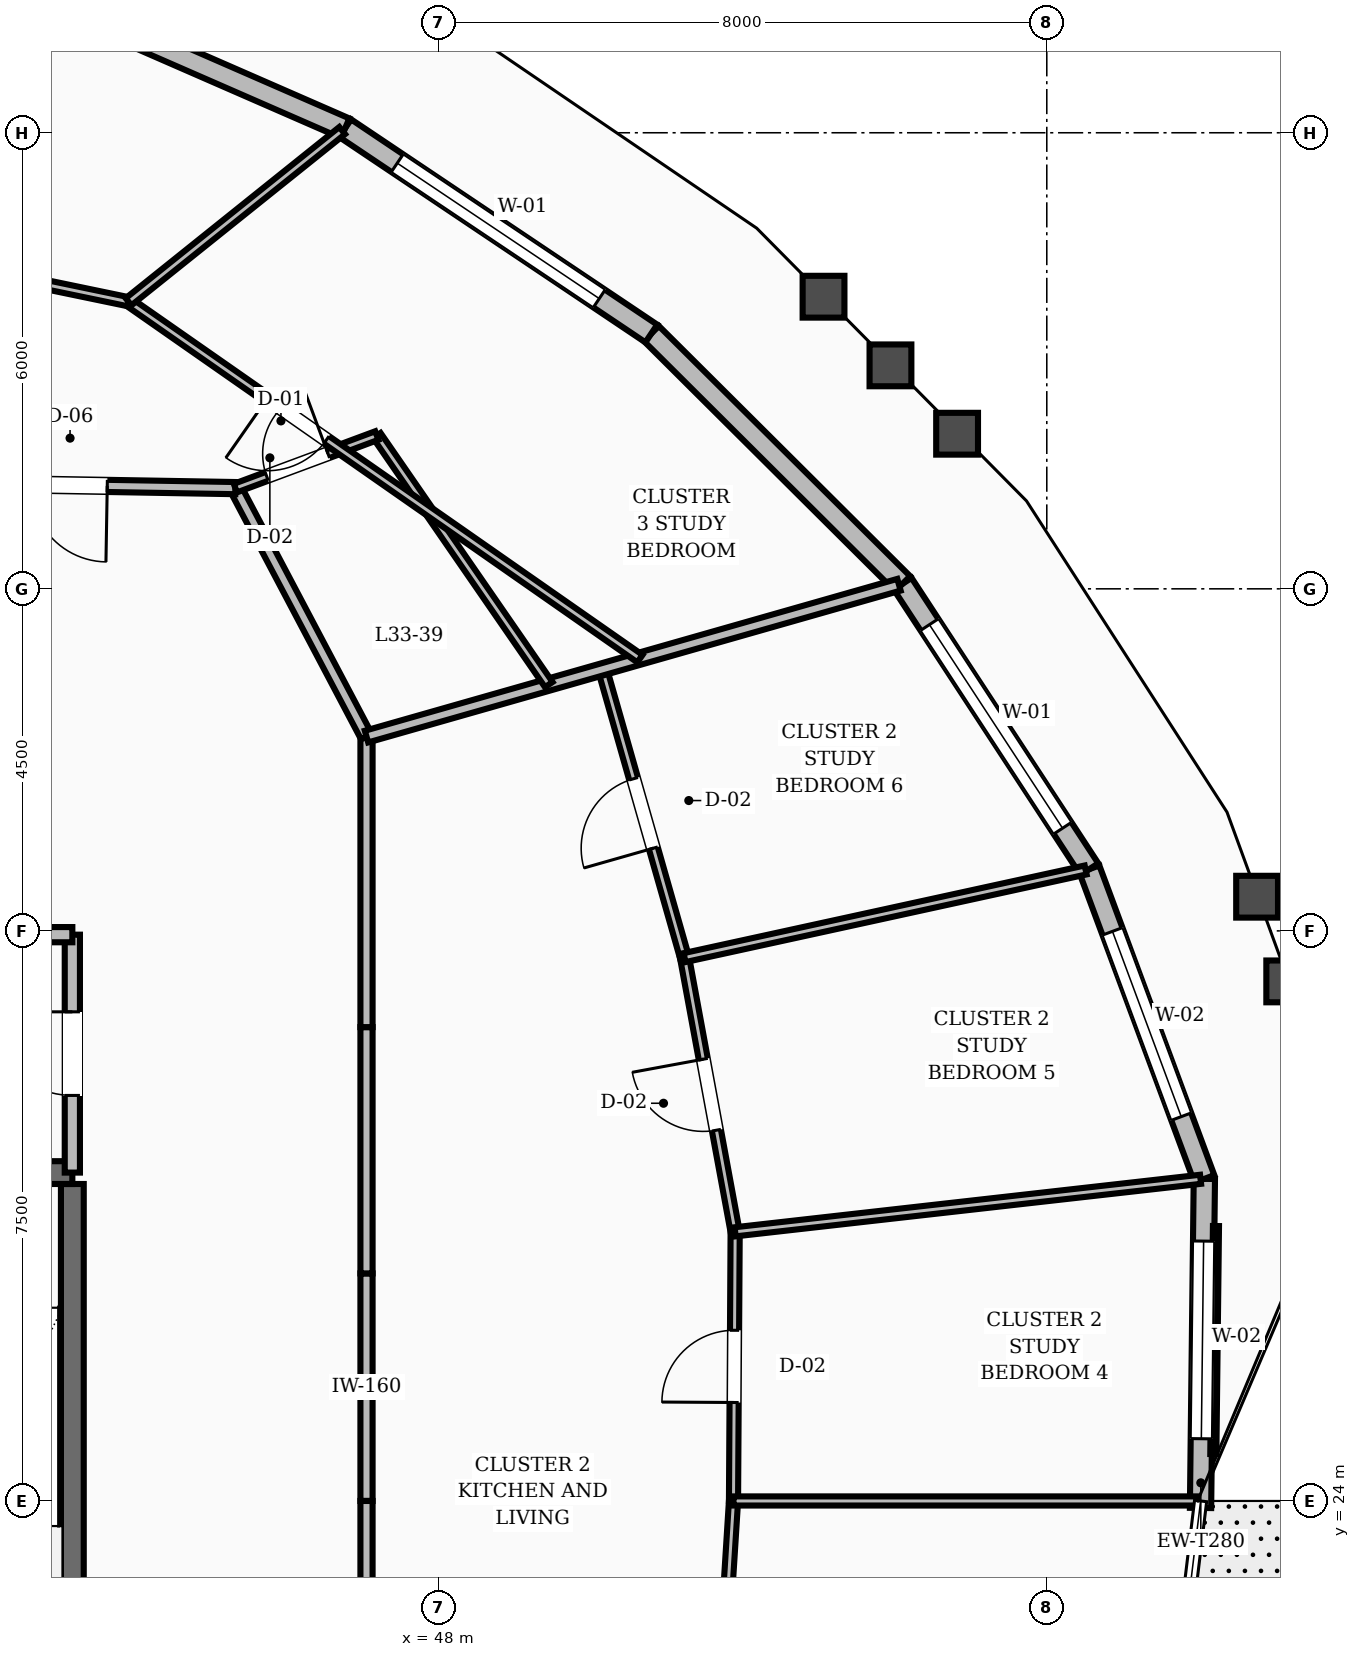
"""IFC4 building model, lengths in metres.
Left out: names, types, materials, properties, quantities, classifications, styles, units other than length and angle.
Written with IfcOpenShell. Run it as: python <this file> out.ifc"""

import sys

from ifc_helpers import new_model, si_unit, direction, frame, frame_2d, origin, place, context, subcontext, project, spatial, rectangle, extrude, element, fill, save


model = new_model("IFC4")
c1 = context("Model", 3, precision=1e-05, world=origin(), true_north=direction((0.0, 1.0)))
c2 = subcontext(c1, "Body", "Model", "MODEL_VIEW")
j1 = project(units=[si_unit("LENGTHUNIT", "METRE"), si_unit("PLANEANGLEUNIT", "RADIAN")], contexts=[c1])
p1 = place(None, origin())
s1 = spatial("IfcSite", under=j1, at=p1, CompositionType="ELEMENT")
p2 = place(p1, origin())
s2 = spatial("IfcBuilding", under=s1, at=p2, CompositionType="ELEMENT")
p3 = place(p2, frame((0.0, 0.0, 131.6)))
s3 = spatial("IfcBuildingStorey", under=s2, at=p3, CompositionType="ELEMENT", Elevation=131.6)
p4 = place(p3, frame((43.18, 19.43, 0.0), z_axis=(0.0, 0.0, 1.0), x_axis=(0.0, 1.0, 0.0)))
e1 = element("IfcWall", 1, at=p4, inside=s3, PredefinedType="SHEAR", context=c2, shape_type="SweptSolid", body=[
    extrude(rectangle(XDim=8.74, YDim=0.3, at=frame_2d((4.37, 0.0))), origin(), (0.0, 0.0, 1.0), 3.6),
])
p5 = place(p3, frame((39.58, 28.32, 0.0), z_axis=(0.0, 0.0, 1.0), x_axis=(1.0, 0.0, 0.0)))
e2 = element("IfcWall", 2, at=p5, inside=s3, PredefinedType="SHEAR", context=c2, shape_type="SweptSolid", body=[
    extrude(rectangle(XDim=3.6, YDim=0.3, at=frame_2d((1.8, 0.0))), origin(), (0.0, 0.0, 1.0), 3.6),
])
p6 = place(p5, frame((1.3, 0.0, 0.0)))
e3 = element("IfcOpeningElement", 3, at=p6, cuts=e2, PredefinedType="OPENING", context=c2, shape_type="SweptSolid", body=[
    extrude(rectangle(XDim=1.1, YDim=2.1, at=frame_2d((0.55, 1.05))), frame((0.0, 0.16, 0.0), z_axis=(0.0, -1.0, 0.0), x_axis=(1.0, 0.0, 0.0)), (0.0, 0.0, 1.0), 0.32),
])
p7 = place(p3, frame((58.023, 23.908, 0.0), z_axis=(0.0, 0.0, 1.0), x_axis=(0.011615321034, 0.999932539883, 0.0)))
e4 = element("IfcWall", 4, at=p7, inside=s3, PredefinedType="STANDARD", context=c2, shape_type="SweptSolid", body=[
    extrude(rectangle(XDim=4.33, YDim=0.28, at=frame_2d((2.165, 0.0))), origin(), (0.0, 0.0, 1.0), 2.82),
])
p8 = place(p7, frame((0.911, 0.0, 0.8)))
e5 = element("IfcOpeningElement", 5, at=p8, cuts=e4, PredefinedType="OPENING", context=c2, shape_type="SweptSolid", body=[
    extrude(rectangle(XDim=2.6, YDim=1.65, at=frame_2d((1.3, 0.825))), frame((0.0, 0.15, 0.0), z_axis=(0.0, -1.0, 0.0), x_axis=(1.0, 0.0, 0.0)), (0.0, 0.0, 1.0), 0.3),
])
p9 = place(p3, frame((58.073, 28.238, 0.0), z_axis=(0.0, 0.0, 1.0), x_axis=(-0.348099086438, 0.937457746259, 0.0)))
e6 = element("IfcWall", 6, at=p9, inside=s3, PredefinedType="STANDARD", context=c2, shape_type="SweptSolid", body=[
    extrude(rectangle(XDim=4.346, YDim=0.28, at=frame_2d((2.173, 0.0))), origin(), (0.0, 0.0, 1.0), 2.82),
])
p10 = place(p9, frame((0.873, 0.0, 0.8)))
e7 = element("IfcOpeningElement", 7, at=p10, cuts=e6, PredefinedType="OPENING", context=c2, shape_type="SweptSolid", body=[
    extrude(rectangle(XDim=2.6, YDim=1.65, at=frame_2d((1.3, 0.825))), frame((0.0, 0.15, 0.0), z_axis=(0.0, -1.0, 0.0), x_axis=(1.0, 0.0, 0.0)), (0.0, 0.0, 1.0), 0.3),
])
p11 = place(p3, frame((56.56, 32.312, 0.0), z_axis=(0.0, 0.0, 1.0), x_axis=(-0.547422319482, 0.836856501518, 0.0)))
e8 = element("IfcWall", 8, at=p11, inside=s3, PredefinedType="STANDARD", context=c2, shape_type="SweptSolid", body=[
    extrude(rectangle(XDim=4.488, YDim=0.28, at=frame_2d((2.244, 0.0))), origin(), (0.0, 0.0, 1.0), 2.82),
])
p12 = place(p11, frame((0.644, 0.0, 0.8)))
e9 = element("IfcOpeningElement", 9, at=p12, cuts=e8, PredefinedType="OPENING", context=c2, shape_type="SweptSolid", body=[
    extrude(rectangle(XDim=3.2, YDim=1.65, at=frame_2d((1.6, 0.825))), frame((0.0, 0.15, 0.0), z_axis=(0.0, -1.0, 0.0), x_axis=(1.0, 0.0, 0.0)), (0.0, 0.0, 1.0), 0.3),
])
p13 = place(p3, frame((54.104, 36.067, 0.0), z_axis=(0.0, 0.0, 1.0), x_axis=(-0.708648936292, 0.705561255379, 0.0)))
e10 = element("IfcWall", 10, at=p13, inside=s3, PredefinedType="STANDARD", context=c2, shape_type="SweptSolid", body=[
    extrude(rectangle(XDim=4.665, YDim=0.28, at=frame_2d((2.333, 0.0))), origin(), (0.0, 0.0, 1.0), 2.82),
])
p14 = place(p3, frame((50.798, 39.359, 0.0), z_axis=(0.0, 0.0, 1.0), x_axis=(-0.830576039751, 0.556905236277, 0.0)))
e11 = element("IfcWall", 11, at=p14, inside=s3, PredefinedType="STANDARD", context=c2, shape_type="SweptSolid", body=[
    extrude(rectangle(XDim=4.85, YDim=0.28, at=frame_2d((2.425, 0.0))), origin(), (0.0, 0.0, 1.0), 2.82),
])
p15 = place(p14, frame((0.825, 0.0, 0.8)))
e12 = element("IfcOpeningElement", 12, at=p15, cuts=e11, PredefinedType="OPENING", context=c2, shape_type="SweptSolid", body=[
    extrude(rectangle(XDim=3.2, YDim=1.65, at=frame_2d((1.6, 0.825))), frame((0.0, 0.15, 0.0), z_axis=(0.0, -1.0, 0.0), x_axis=(1.0, 0.0, 0.0)), (0.0, 0.0, 1.0), 0.3),
])
p16 = place(p3, frame((46.769, 42.06, 0.0), z_axis=(0.0, 0.0, 1.0), x_axis=(-0.916424160111, 0.400208394171, 0.0)))
e13 = element("IfcWall", 13, at=p16, inside=s3, PredefinedType="STANDARD", context=c2, shape_type="SweptSolid", body=[
    extrude(rectangle(XDim=5.015, YDim=0.28, at=frame_2d((2.508, 0.0))), origin(), (0.0, 0.0, 1.0), 2.82),
])
p17 = place(p3, frame((43.18, 28.32, 0.0), z_axis=(0.0, 0.0, 1.0), x_axis=(0.0, 1.0, 0.0)))
e14 = element("IfcWall", 14, at=p17, inside=s3, PredefinedType="SOLIDWALL", context=c2, shape_type="SweptSolid", body=[
    extrude(rectangle(XDim=3.13, YDim=0.2, at=frame_2d((1.565, 0.0))), origin(), (0.0, 0.0, 1.0), 2.8),
])
p18 = place(p17, frame((1.015, 0.0, 0.0)))
e15 = element("IfcOpeningElement", 15, at=p18, cuts=e14, PredefinedType="OPENING", context=c2, shape_type="SweptSolid", body=[
    extrude(rectangle(XDim=1.1, YDim=2.1, at=frame_2d((0.55, 1.05))), frame((0.0, 0.11, 0.0), z_axis=(0.0, -1.0, 0.0), x_axis=(1.0, 0.0, 0.0)), (0.0, 0.0, 1.0), 0.22),
])
p19 = place(p3, frame((39.2, 31.45, 0.0), z_axis=(0.0, 0.0, 1.0), x_axis=(1.0, 0.0, 0.0)))
e16 = element("IfcWall", 16, at=p19, inside=s3, PredefinedType="SOLIDWALL", context=c2, shape_type="SweptSolid", body=[
    extrude(rectangle(XDim=3.98, YDim=0.2, at=frame_2d((1.99, 0.0))), origin(), (0.0, 0.0, 1.0), 2.8),
])
p20 = place(p3, frame((47.05, 24.0, 0.0), z_axis=(0.0, 0.0, 1.0), x_axis=(0.0, 1.0, 0.0)))
e17 = element("IfcWall", 17, at=p20, inside=s3, PredefinedType="SOLIDWALL", context=c2, shape_type="SweptSolid", body=[
    extrude(rectangle(XDim=2.994, YDim=0.16, at=frame_2d((1.497, 0.0))), origin(), (0.0, 0.0, 1.0), 2.8),
])
p21 = place(p3, frame((47.05, 26.994, 0.0), z_axis=(0.0, 0.0, 1.0), x_axis=(0.0, 1.0, 0.0)))
e18 = element("IfcWall", 18, at=p21, inside=s3, PredefinedType="SOLIDWALL", context=c2, shape_type="SweptSolid", body=[
    extrude(rectangle(XDim=3.24, YDim=0.16, at=frame_2d((1.62, 0.0))), origin(), (0.0, 0.0, 1.0), 2.8),
])
p22 = place(p3, frame((47.05, 30.234, 0.0), z_axis=(0.0, 0.0, 1.0), x_axis=(0.0, 1.0, 0.0)))
e19 = element("IfcWall", 19, at=p22, inside=s3, PredefinedType="SOLIDWALL", context=c2, shape_type="SweptSolid", body=[
    extrude(rectangle(XDim=3.822, YDim=0.16, at=frame_2d((1.911, 0.0))), origin(), (0.0, 0.0, 1.0), 2.8),
])
p23 = place(p3, frame((47.05, 34.056, 0.0), z_axis=(0.0, 0.0, 1.0), x_axis=(-0.466737093093, 0.884396113702, 0.0)))
e20 = element("IfcWall", 20, at=p23, inside=s3, PredefinedType="SOLIDWALL", context=c2, shape_type="SweptSolid", body=[
    extrude(rectangle(XDim=3.696, YDim=0.16, at=frame_2d((1.848, 0.0))), origin(), (0.0, 0.0, 1.0), 2.8),
])
p24 = place(p3, frame((45.325, 37.325, 0.0), z_axis=(0.0, 0.0, 1.0), x_axis=(-0.999853038912, 0.017143528788, 0.0)))
e21 = element("IfcWall", 21, at=p24, inside=s3, PredefinedType="SOLIDWALL", context=c2, shape_type="SweptSolid", body=[
    extrude(rectangle(XDim=4.372, YDim=0.16, at=frame_2d((2.186, 0.0))), origin(), (0.0, 0.0, 1.0), 2.8),
])
p25 = place(p24, frame((1.686, 0.0, 0.0)))
e22 = element("IfcOpeningElement", 22, at=p25, cuts=e21, PredefinedType="OPENING", context=c2, shape_type="SweptSolid", body=[
    extrude(rectangle(XDim=1.0, YDim=2.1, at=frame_2d((0.5, 1.05))), frame((0.0, 0.09, 0.0), z_axis=(0.0, -1.0, 0.0), x_axis=(1.0, 0.0, 0.0)), (0.0, 0.0, 1.0), 0.18),
])
p26 = place(p3, frame((47.05, 21.006, 0.0), z_axis=(0.0, 0.0, 1.0), x_axis=(0.0, 1.0, 0.0)))
e23 = element("IfcWall", 23, at=p26, inside=s3, PredefinedType="SOLIDWALL", context=c2, shape_type="SweptSolid", body=[
    extrude(rectangle(XDim=2.994, YDim=0.16, at=frame_2d((1.497, 0.0))), origin(), (0.0, 0.0, 1.0), 2.8),
])
p27 = place(p3, frame((51.658, 20.507, 0.0), z_axis=(0.0, 0.0, 1.0), x_axis=(0.062851654095, 0.998022880288, 0.0)))
e24 = element("IfcWall", 24, at=p27, inside=s3, PredefinedType="PARTITIONING", context=c2, shape_type="SweptSolid", body=[
    extrude(rectangle(XDim=3.5, YDim=0.12, at=frame_2d((1.75, 0.0))), origin(), (0.0, 0.0, 1.0), 2.8),
])
p28 = place(p27, frame((1.275, 0.0, 0.0)))
e25 = element("IfcOpeningElement", 25, at=p28, cuts=e24, PredefinedType="OPENING", context=c2, shape_type="SweptSolid", body=[
    extrude(rectangle(XDim=0.95, YDim=2.1, at=frame_2d((0.475, 1.05))), frame((0.0, 0.07, 0.0), z_axis=(0.0, -1.0, 0.0), x_axis=(1.0, 0.0, 0.0)), (0.0, 0.0, 1.0), 0.14),
])
p29 = place(p3, frame((51.878, 24.0, 0.0), z_axis=(0.0, 0.0, 1.0), x_axis=(0.006136122757, 0.999981173822, 0.0)))
e26 = element("IfcWall", 26, at=p29, inside=s3, PredefinedType="PARTITIONING", context=c2, shape_type="SweptSolid", body=[
    extrude(rectangle(XDim=3.541, YDim=0.12, at=frame_2d((1.771, 0.0))), origin(), (0.0, 0.0, 1.0), 2.8),
])
p30 = place(p29, frame((1.295, 0.0, 0.0)))
e27 = element("IfcOpeningElement", 27, at=p30, cuts=e26, PredefinedType="OPENING", context=c2, shape_type="SweptSolid", body=[
    extrude(rectangle(XDim=0.95, YDim=2.1, at=frame_2d((0.475, 1.05))), frame((0.0, 0.07, 0.0), z_axis=(0.0, -1.0, 0.0), x_axis=(1.0, 0.0, 0.0)), (0.0, 0.0, 1.0), 0.14),
])
p31 = place(p3, frame((51.878, 24.0, 0.0), z_axis=(0.0, 0.0, 1.0), x_axis=(1.0, 0.0, 0.0)))
e28 = element("IfcWall", 28, at=p31, inside=s3, PredefinedType="PARTITIONING", context=c2, shape_type="SweptSolid", body=[
    extrude(rectangle(XDim=6.095, YDim=0.12, at=frame_2d((3.048, 0.0))), origin(), (0.0, 0.0, 1.0), 2.8),
])
p32 = place(p3, frame((51.9, 27.541, 0.0), z_axis=(0.0, 0.0, 1.0), x_axis=(-0.181502919565, 0.983390405785, 0.0)))
e29 = element("IfcWall", 29, at=p32, inside=s3, PredefinedType="PARTITIONING", context=c2, shape_type="SweptSolid", body=[
    extrude(rectangle(XDim=3.668, YDim=0.12, at=frame_2d((1.834, 0.0))), origin(), (0.0, 0.0, 1.0), 2.8),
])
p33 = place(p32, frame((1.359, 0.0, 0.0)))
e30 = element("IfcOpeningElement", 30, at=p33, cuts=e29, PredefinedType="OPENING", context=c2, shape_type="SweptSolid", body=[
    extrude(rectangle(XDim=0.95, YDim=2.1, at=frame_2d((0.475, 1.05))), frame((0.0, 0.07, 0.0), z_axis=(0.0, -1.0, 0.0), x_axis=(1.0, 0.0, 0.0)), (0.0, 0.0, 1.0), 0.14),
])
p34 = place(p3, frame((51.9, 27.541, 0.0), z_axis=(0.0, 0.0, 1.0), x_axis=(0.993693846481, 0.112127335947, 0.0)))
e31 = element("IfcWall", 31, at=p34, inside=s3, PredefinedType="PARTITIONING", context=c2, shape_type="SweptSolid", body=[
    extrude(rectangle(XDim=6.162, YDim=0.12, at=frame_2d((3.081, 0.0))), origin(), (0.0, 0.0, 1.0), 2.8),
])
p35 = place(p3, frame((51.234, 31.148, 0.0), z_axis=(0.0, 0.0, 1.0), x_axis=(-0.274058783109, 0.961712942307, 0.0)))
e32 = element("IfcWall", 32, at=p35, inside=s3, PredefinedType="PARTITIONING", context=c2, shape_type="SweptSolid", body=[
    extrude(rectangle(XDim=3.944, YDim=0.12, at=frame_2d((1.972, 0.0))), origin(), (0.0, 0.0, 1.0), 2.8),
])
p36 = place(p35, frame((1.497, 0.0, 0.0)))
e33 = element("IfcOpeningElement", 33, at=p36, cuts=e32, PredefinedType="OPENING", context=c2, shape_type="SweptSolid", body=[
    extrude(rectangle(XDim=0.95, YDim=2.1, at=frame_2d((0.475, 1.05))), frame((0.0, 0.07, 0.0), z_axis=(0.0, -1.0, 0.0), x_axis=(1.0, 0.0, 0.0)), (0.0, 0.0, 1.0), 0.14),
])
p37 = place(p3, frame((51.234, 31.148, 0.0), z_axis=(0.0, 0.0, 1.0), x_axis=(0.976938334756, 0.213521638447, 0.0)))
e34 = element("IfcWall", 34, at=p37, inside=s3, PredefinedType="PARTITIONING", context=c2, shape_type="SweptSolid", body=[
    extrude(rectangle(XDim=5.401, YDim=0.12, at=frame_2d((2.701, 0.0))), origin(), (0.0, 0.0, 1.0), 2.8),
])
p38 = place(p3, frame((47.05, 34.056, 0.0), z_axis=(0.0, 0.0, 1.0), x_axis=(0.961667991251, 0.274216473981, 0.0)))
e35 = element("IfcWall", 35, at=p38, inside=s3, PredefinedType="SOLIDWALL", context=c2, shape_type="SweptSolid", body=[
    extrude(rectangle(XDim=7.285, YDim=0.16, at=frame_2d((3.642, 0.0))), origin(), (0.0, 0.0, 1.0), 2.8),
])
p39 = place(p3, frame((49.448, 34.74, 0.0), z_axis=(0.0, 0.0, 1.0), x_axis=(-0.568195659841, 0.822893487723, 0.0)))
e36 = element("IfcWall", 36, at=p39, inside=s3, PredefinedType="PARTITIONING", context=c2, shape_type="SweptSolid", body=[
    extrude(rectangle(XDim=3.982, YDim=0.12, at=frame_2d((1.991, 0.0))), origin(), (0.0, 0.0, 1.0), 2.8),
])
p40 = place(p3, frame((45.325, 37.325, 0.0), z_axis=(0.0, 0.0, 1.0), x_axis=(0.937346114238, 0.348399572506, 0.0)))
e37 = element("IfcWall", 37, at=p40, inside=s3, PredefinedType="PARTITIONING", context=c2, shape_type="SweptSolid", body=[
    extrude(rectangle(XDim=1.985, YDim=0.12, at=frame_2d((0.993, 0.0))), origin(), (0.0, 0.0, 1.0), 2.8),
])
p41 = place(p40, frame((0.44, 0.0, 0.0)))
e38 = element("IfcOpeningElement", 38, at=p41, cuts=e37, PredefinedType="OPENING", context=c2, shape_type="SweptSolid", body=[
    extrude(rectangle(XDim=0.86, YDim=2.1, at=frame_2d((0.43, 1.05))), frame((0.0, 0.07, 0.0), z_axis=(0.0, -1.0, 0.0), x_axis=(1.0, 0.0, 0.0)), (0.0, 0.0, 1.0), 0.14),
])
p42 = place(p3, frame((50.647, 35.082, 0.0), z_axis=(0.0, 0.0, 1.0), x_axis=(-0.820068492929, 0.572265381537, 0.0)))
e39 = element("IfcWall", 39, at=p42, inside=s3, PredefinedType="PARTITIONING", context=c2, shape_type="SweptSolid", body=[
    extrude(rectangle(XDim=8.204, YDim=0.12, at=frame_2d((4.102, 0.0))), origin(), (0.0, 0.0, 1.0), 2.8),
])
p43 = place(p42, frame((5.029, 0.0, 0.0)))
e40 = element("IfcOpeningElement", 40, at=p43, cuts=e39, PredefinedType="OPENING", context=c2, shape_type="SweptSolid", body=[
    extrude(rectangle(XDim=0.95, YDim=2.1, at=frame_2d((0.475, 1.05))), frame((0.0, 0.07, 0.0), z_axis=(0.0, -1.0, 0.0), x_axis=(1.0, 0.0, 0.0)), (0.0, 0.0, 1.0), 0.14),
])
p44 = place(p3, frame((43.919, 39.777, 0.0), z_axis=(0.0, 0.0, 1.0), x_axis=(-0.97912865648, 0.20324141817, 0.0)))
e41 = element("IfcWall", 41, at=p44, inside=s3, PredefinedType="PARTITIONING", context=c2, shape_type="SweptSolid", body=[
    extrude(rectangle(XDim=8.138, YDim=0.12, at=frame_2d((4.069, 0.0))), origin(), (0.0, 0.0, 1.0), 2.8),
])
p45 = place(p44, frame((3.594, 0.0, 0.0)))
e42 = element("IfcOpeningElement", 42, at=p45, cuts=e41, PredefinedType="OPENING", context=c2, shape_type="SweptSolid", body=[
    extrude(rectangle(XDim=0.95, YDim=2.1, at=frame_2d((0.475, 1.05))), frame((0.0, 0.07, 0.0), z_axis=(0.0, -1.0, 0.0), x_axis=(1.0, 0.0, 0.0)), (0.0, 0.0, 1.0), 0.14),
])
p46 = place(p3, frame((43.919, 39.777, 0.0), z_axis=(0.0, 0.0, 1.0), x_axis=(0.780359323849, 0.625331372699, 0.0)))
e43 = element("IfcWall", 43, at=p46, inside=s3, PredefinedType="PARTITIONING", context=c2, shape_type="SweptSolid", body=[
    extrude(rectangle(XDim=3.602, YDim=0.12, at=frame_2d((1.801, 0.0))), origin(), (0.0, 0.0, 1.0), 2.8),
])
p47 = place(p8, origin())
e44 = element("IfcWindow", 44, at=p47, inside=s3, PartitioningType="SINGLE_PANEL", PredefinedType="WINDOW", context=c2, shape_type="SweptSolid", body=[
    extrude(rectangle(XDim=2.6, YDim=1.65, at=frame_2d((1.3, 0.825))), frame((0.0, 0.03, 0.0), z_axis=(0.0, -1.0, 0.0), x_axis=(1.0, 0.0, 0.0)), (0.0, 0.0, 1.0), 0.06),
])
fill(e5, e44)
p48 = place(p10, origin())
e45 = element("IfcWindow", 45, at=p48, inside=s3, PartitioningType="SINGLE_PANEL", PredefinedType="WINDOW", context=c2, shape_type="SweptSolid", body=[
    extrude(rectangle(XDim=2.6, YDim=1.65, at=frame_2d((1.3, 0.825))), frame((0.0, 0.03, 0.0), z_axis=(0.0, -1.0, 0.0), x_axis=(1.0, 0.0, 0.0)), (0.0, 0.0, 1.0), 0.06),
])
fill(e7, e45)
p49 = place(p12, origin())
e46 = element("IfcWindow", 46, at=p49, inside=s3, PartitioningType="SINGLE_PANEL", PredefinedType="WINDOW", context=c2, shape_type="SweptSolid", body=[
    extrude(rectangle(XDim=3.2, YDim=1.65, at=frame_2d((1.6, 0.825))), frame((0.0, 0.03, 0.0), z_axis=(0.0, -1.0, 0.0), x_axis=(1.0, 0.0, 0.0)), (0.0, 0.0, 1.0), 0.06),
])
fill(e9, e46)
p50 = place(p15, origin())
e47 = element("IfcWindow", 47, at=p50, inside=s3, PartitioningType="SINGLE_PANEL", PredefinedType="WINDOW", context=c2, shape_type="SweptSolid", body=[
    extrude(rectangle(XDim=3.2, YDim=1.65, at=frame_2d((1.6, 0.825))), frame((0.0, 0.03, 0.0), z_axis=(0.0, -1.0, 0.0), x_axis=(1.0, 0.0, 0.0)), (0.0, 0.0, 1.0), 0.06),
])
fill(e12, e47)
p51 = place(p18, origin())
e48 = element("IfcDoor", 48, at=p51, inside=s3, OperationType="SINGLE_SWING_RIGHT", PredefinedType="DOOR", context=c2, shape_type="SweptSolid", body=[
    extrude(rectangle(XDim=1.1, YDim=2.1, at=frame_2d((0.55, 1.05))), frame((0.0, 0.025, 0.0), z_axis=(0.0, -1.0, 0.0), x_axis=(1.0, 0.0, 0.0)), (0.0, 0.0, 1.0), 0.05),
])
fill(e15, e48)
p52 = place(p30, origin())
e49 = element("IfcDoor", 49, at=p52, inside=s3, OperationType="SINGLE_SWING_LEFT", PredefinedType="DOOR", context=c2, shape_type="SweptSolid", body=[
    extrude(rectangle(XDim=0.95, YDim=2.1, at=frame_2d((0.475, 1.05))), frame((0.0, 0.025, 0.0), z_axis=(0.0, -1.0, 0.0), x_axis=(1.0, 0.0, 0.0)), (0.0, 0.0, 1.0), 0.05),
])
fill(e27, e49)
p53 = place(p33, origin())
e50 = element("IfcDoor", 50, at=p53, inside=s3, OperationType="SINGLE_SWING_RIGHT", PredefinedType="DOOR", context=c2, shape_type="SweptSolid", body=[
    extrude(rectangle(XDim=0.95, YDim=2.1, at=frame_2d((0.475, 1.05))), frame((0.0, 0.025, 0.0), z_axis=(0.0, -1.0, 0.0), x_axis=(1.0, 0.0, 0.0)), (0.0, 0.0, 1.0), 0.05),
])
fill(e30, e50)
p54 = place(p36, origin())
e51 = element("IfcDoor", 51, at=p54, inside=s3, OperationType="SINGLE_SWING_LEFT", PredefinedType="DOOR", context=c2, shape_type="SweptSolid", body=[
    extrude(rectangle(XDim=0.95, YDim=2.1, at=frame_2d((0.475, 1.05))), frame((0.0, 0.025, 0.0), z_axis=(0.0, -1.0, 0.0), x_axis=(1.0, 0.0, 0.0)), (0.0, 0.0, 1.0), 0.05),
])
fill(e33, e51)
p55 = place(p41, origin())
e52 = element("IfcDoor", 52, at=p55, inside=s3, OperationType="SINGLE_SWING_RIGHT", PredefinedType="DOOR", context=c2, shape_type="SweptSolid", body=[
    extrude(rectangle(XDim=0.86, YDim=2.1, at=frame_2d((0.43, 1.05))), frame((0.0, 0.025, 0.0), z_axis=(0.0, -1.0, 0.0), x_axis=(1.0, 0.0, 0.0)), (0.0, 0.0, 1.0), 0.05),
])
fill(e38, e52)
p56 = place(p25, origin())
e53 = element("IfcDoor", 53, at=p56, inside=s3, OperationType="SINGLE_SWING_LEFT", PredefinedType="DOOR", context=c2, shape_type="SweptSolid", body=[
    extrude(rectangle(XDim=1.0, YDim=2.1, at=frame_2d((0.5, 1.05))), frame((0.0, 0.025, 0.0), z_axis=(0.0, -1.0, 0.0), x_axis=(1.0, 0.0, 0.0)), (0.0, 0.0, 1.0), 0.05),
])
fill(e22, e53)
p57 = place(p43, origin())
e54 = element("IfcDoor", 54, at=p57, inside=s3, OperationType="SINGLE_SWING_RIGHT", PredefinedType="DOOR", context=c2, shape_type="SweptSolid", body=[
    extrude(rectangle(XDim=0.95, YDim=2.1, at=frame_2d((0.475, 1.05))), frame((0.0, 0.025, 0.0), z_axis=(0.0, -1.0, 0.0), x_axis=(1.0, 0.0, 0.0)), (0.0, 0.0, 1.0), 0.05),
])
fill(e40, e54)
save(model, sys.argv[1])
